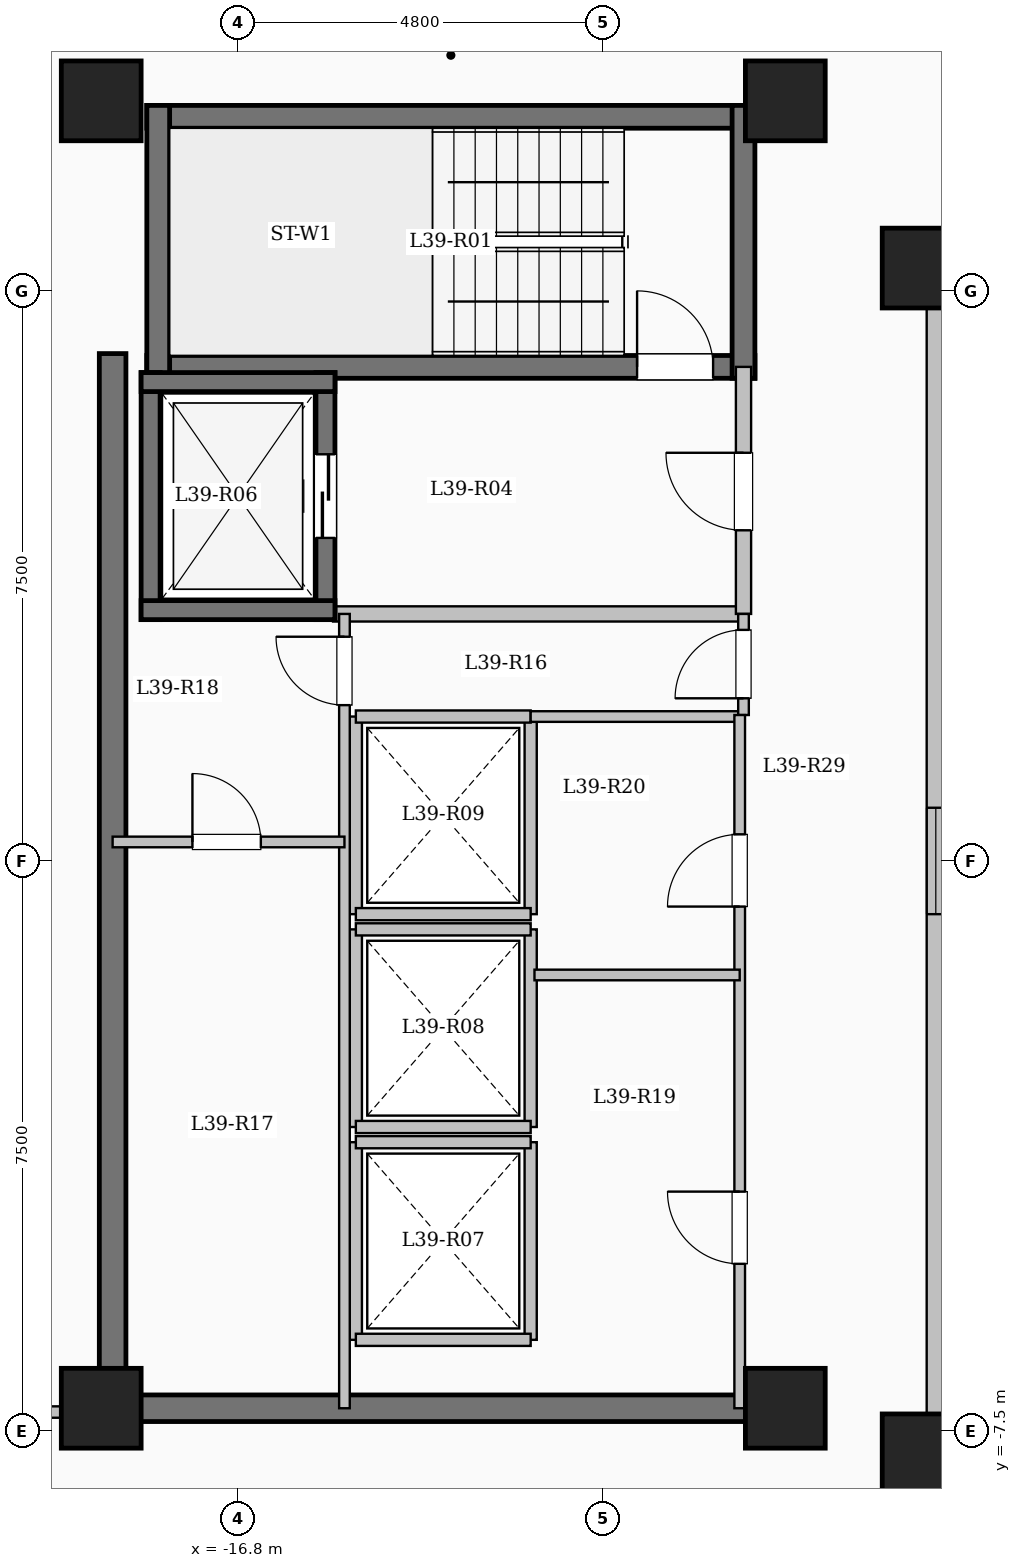
"""IFC4 building model, lengths in metres.
Left out: names, types, materials, properties, quantities, classifications, styles, units other than length and angle.
Written with IfcOpenShell. Run it as: python <this file> out.ifc"""

import sys

from ifc_helpers import new_model, si_unit, direction, frame, frame_2d, origin, origin_2d, place, context, subcontext, project, spatial, rectangle, extrude, element, fill, save


model = new_model("IFC4")
c1 = context("Model", 3, precision=1e-05, world=origin(), true_north=direction((0.0, 1.0)))
c2 = subcontext(c1, "Body", "Model", "MODEL_VIEW")
j1 = project(units=[si_unit("LENGTHUNIT", "METRE"), si_unit("PLANEANGLEUNIT", "RADIAN")], contexts=[c1])
p1 = place(None, origin())
s1 = spatial("IfcSite", under=j1, at=p1, CompositionType="ELEMENT")
p2 = place(p1, origin())
s2 = spatial("IfcBuilding", under=s1, at=p2, CompositionType="ELEMENT")
p3 = place(p2, frame((0.0, 0.0, 146.0)))
s3 = spatial("IfcBuildingStorey", under=s2, at=p3, CompositionType="ELEMENT", Elevation=146.0)
for number, where, z_axis, x_axis in (
    (1, (-7.8, -7.8, 0.0), (0.0, 0.0, 1.0), (1.0, 0.0, 0.0)),
    (2, (-7.8, 7.8, 0.0), (0.0, 0.0, 1.0), (1.0, 0.0, 0.0)),
    (3, (-9.6, -7.2, 0.0), (0.0, 0.0, 1.0), (1.0, 0.0, 0.0)),
    (4, (-9.6, 10.0, 0.0), (0.0, 0.0, 1.0), (1.0, 0.0, 0.0)),
    (5, (-18.6, -7.2, 0.0), (0.0, 0.0, 1.0), (1.0, 0.0, 0.0)),
    (6, (-18.6, 10.0, 0.0), (0.0, 0.0, 1.0), (1.0, 0.0, 0.0)),
):
    element("IfcColumn", number, at=place(p3, frame(where, z_axis=z_axis, x_axis=x_axis)), inside=s3, PredefinedType="COLUMN", context=c2, shape_type="SweptSolid", body=[
        extrude(rectangle(XDim=1.05, YDim=1.05, at=origin_2d()), origin(), (0.0, 0.0, 1.0), 3.35),
    ])
p4 = place(p3, frame((-7.62, -7.62, 0.0), z_axis=(0.0, 0.0, 1.0), x_axis=(1.0, 0.0, 0.0)))
e7 = element("IfcWall", 7, at=p4, inside=s3, PredefinedType="SOLIDWALL", context=c2, shape_type="SweptSolid", body=[
    extrude(rectangle(XDim=15.24, YDim=0.24, at=frame_2d((7.62, 0.0))), origin(), (0.0, 0.0, 1.0), 3.1),
])
p5 = place(p4, frame((6.92, 0.0, 0.95)))
e8 = element("IfcOpeningElement", 8, at=p5, cuts=e7, PredefinedType="OPENING", context=c2, shape_type="SweptSolid", body=[
    extrude(rectangle(XDim=1.4, YDim=1.5, at=frame_2d((0.7, 0.75))), frame((0.0, 0.13, 0.0), z_axis=(0.0, -1.0, 0.0), x_axis=(1.0, 0.0, 0.0)), (0.0, 0.0, 1.0), 0.26),
])
p6 = place(p3, frame((7.62, 7.62, 0.0), z_axis=(0.0, 0.0, 1.0), x_axis=(-1.0, 0.0, 0.0)))
e9 = element("IfcWall", 9, at=p6, inside=s3, PredefinedType="SOLIDWALL", context=c2, shape_type="SweptSolid", body=[
    extrude(rectangle(XDim=15.24, YDim=0.24, at=frame_2d((7.62, 0.0))), origin(), (0.0, 0.0, 1.0), 3.1),
])
p7 = place(p6, frame((6.92, 0.0, 0.95)))
e10 = element("IfcOpeningElement", 10, at=p7, cuts=e9, PredefinedType="OPENING", context=c2, shape_type="SweptSolid", body=[
    extrude(rectangle(XDim=1.4, YDim=1.5, at=frame_2d((0.7, 0.75))), frame((0.0, 0.13, 0.0), z_axis=(0.0, -1.0, 0.0), x_axis=(1.0, 0.0, 0.0)), (0.0, 0.0, 1.0), 0.26),
])
p8 = place(p3, frame((-7.62, 7.62, 0.0), z_axis=(0.0, 0.0, 1.0), x_axis=(0.0, -1.0, 0.0)))
e11 = element("IfcWall", 11, at=p8, inside=s3, PredefinedType="SOLIDWALL", context=c2, shape_type="SweptSolid", body=[
    extrude(rectangle(XDim=15.24, YDim=0.24, at=frame_2d((7.62, 0.0))), origin(), (0.0, 0.0, 1.0), 3.1),
])
p9 = place(p8, frame((6.92, 0.0, 0.95)))
e12 = element("IfcOpeningElement", 12, at=p9, cuts=e11, PredefinedType="OPENING", context=c2, shape_type="SweptSolid", body=[
    extrude(rectangle(XDim=1.4, YDim=1.5, at=frame_2d((0.7, 0.75))), frame((0.0, 0.13, 0.0), z_axis=(0.0, -1.0, 0.0), x_axis=(1.0, 0.0, 0.0)), (0.0, 0.0, 1.0), 0.26),
])
p10 = place(p3, frame((-18.0, 9.79, 0.0), z_axis=(0.0, 0.0, 1.0), x_axis=(1.0, 0.0, 0.0)))
e13 = element("IfcWall", 13, at=p10, inside=s3, PredefinedType="SHEAR", context=c2, shape_type="SweptSolid", body=[
    extrude(rectangle(XDim=8.0, YDim=0.3, at=frame_2d((4.0, 0.0))), origin(), (0.0, 0.0, 1.0), 3.35),
])
p11 = place(p3, frame((-18.0, 6.5, 0.0), z_axis=(0.0, 0.0, 1.0), x_axis=(1.0, 0.0, 0.0)))
e14 = element("IfcWall", 14, at=p11, inside=s3, PredefinedType="SHEAR", context=c2, shape_type="SweptSolid", body=[
    extrude(rectangle(XDim=8.0, YDim=0.3, at=frame_2d((4.0, 0.0))), origin(), (0.0, 0.0, 1.0), 3.35),
])
p12 = place(p11, frame((6.45, 0.0, 0.0)))
e15 = element("IfcOpeningElement", 15, at=p12, cuts=e14, PredefinedType="OPENING", context=c2, shape_type="SweptSolid", body=[
    extrude(rectangle(XDim=1.0, YDim=2.15, at=frame_2d((0.5, 1.075))), frame((0.0, 0.16, 0.0), z_axis=(0.0, -1.0, 0.0), x_axis=(1.0, 0.0, 0.0)), (0.0, 0.0, 1.0), 0.32),
])
for number, where, z_axis, x_axis in (
    (16, (-17.85, 6.35, 0.0), (0.0, 0.0, 1.0), (0.0, 1.0, 0.0)),
    (17, (-10.15, 6.35, 0.0), (0.0, 0.0, 1.0), (0.0, 1.0, 0.0)),
):
    element("IfcWall", number, at=place(p3, frame(where, z_axis=z_axis, x_axis=x_axis)), inside=s3, PredefinedType="SHEAR", context=c2, shape_type="SweptSolid", body=[
        extrude(rectangle(XDim=3.59, YDim=0.3, at=frame_2d((1.795, 0.0))), origin(), (0.0, 0.0, 1.0), 3.35),
    ])
p13 = place(p3, frame((-15.55, 3.25, 0.0), z_axis=(0.0, 0.0, 1.0), x_axis=(1.0, 0.0, 0.0)))
e18 = element("IfcWall", 18, at=p13, inside=s3, PredefinedType="SOLIDWALL", context=c2, shape_type="SweptSolid", body=[
    extrude(rectangle(XDim=5.4, YDim=0.2, at=frame_2d((2.7, 0.0))), origin(), (0.0, 0.0, 1.0), 3.1),
])
p14 = place(p3, frame((-10.15, 3.25, 0.0), z_axis=(0.0, 0.0, 1.0), x_axis=(0.0, 1.0, 0.0)))
e19 = element("IfcWall", 19, at=p14, inside=s3, PredefinedType="SOLIDWALL", context=c2, shape_type="SweptSolid", body=[
    extrude(rectangle(XDim=3.25, YDim=0.2, at=frame_2d((1.625, 0.0))), origin(), (0.0, 0.0, 1.0), 3.1),
])
p15 = place(p14, frame((1.1, 0.0, 0.0)))
e20 = element("IfcOpeningElement", 20, at=p15, cuts=e19, PredefinedType="OPENING", context=c2, shape_type="SweptSolid", body=[
    extrude(rectangle(XDim=1.02, YDim=2.15, at=frame_2d((0.51, 1.075))), frame((0.0, 0.11, 0.0), z_axis=(0.0, -1.0, 0.0), x_axis=(1.0, 0.0, 0.0)), (0.0, 0.0, 1.0), 0.22),
])
p16 = place(p3, frame((-17.95, 3.175, 0.0), z_axis=(0.0, 0.0, 1.0), x_axis=(0.0, 1.0, 0.0)))
e21 = element("IfcWall", 21, at=p16, inside=s3, PredefinedType="SHEAR", context=c2, shape_type="SweptSolid", body=[
    extrude(rectangle(XDim=3.25, YDim=0.25, at=frame_2d((1.625, 0.0))), origin(), (0.0, 0.0, 1.0), 3.35),
])
p17 = place(p3, frame((-15.65, 3.175, 0.0), z_axis=(0.0, 0.0, 1.0), x_axis=(0.0, 1.0, 0.0)))
e22 = element("IfcWall", 22, at=p17, inside=s3, PredefinedType="SHEAR", context=c2, shape_type="SweptSolid", body=[
    extrude(rectangle(XDim=3.25, YDim=0.25, at=frame_2d((1.625, 0.0))), origin(), (0.0, 0.0, 1.0), 3.35),
])
p18 = place(p17, frame((1.075, 0.0, 0.0)))
e23 = element("IfcOpeningElement", 23, at=p18, cuts=e22, PredefinedType="OPENING", context=c2, shape_type="SweptSolid", body=[
    extrude(rectangle(XDim=1.1, YDim=2.15, at=frame_2d((0.55, 1.075))), frame((0.0, 0.135, 0.0), z_axis=(0.0, -1.0, 0.0), x_axis=(1.0, 0.0, 0.0)), (0.0, 0.0, 1.0), 0.27),
])
for number, where, z_axis, x_axis in (
    (24, (-18.075, 3.3, 0.0), (0.0, 0.0, 1.0), (1.0, 0.0, 0.0)),
    (25, (-18.075, 6.3, 0.0), (0.0, 0.0, 1.0), (1.0, 0.0, 0.0)),
):
    element("IfcWall", number, at=place(p3, frame(where, z_axis=z_axis, x_axis=x_axis)), inside=s3, PredefinedType="SHEAR", context=c2, shape_type="SweptSolid", body=[
        extrude(rectangle(XDim=2.55, YDim=0.25, at=frame_2d((1.275, 0.0))), origin(), (0.0, 0.0, 1.0), 3.35),
    ])
for number, where, z_axis, x_axis in (
    (26, (-15.25, -6.3, 0.0), (0.0, 0.0, 1.0), (0.0, 1.0, 0.0)),
    (27, (-12.95, -6.3, 0.0), (0.0, 0.0, 1.0), (0.0, 1.0, 0.0)),
):
    element("IfcWall", number, at=place(p3, frame(where, z_axis=z_axis, x_axis=x_axis)), inside=s3, PredefinedType="SOLIDWALL", context=c2, shape_type="SweptSolid", body=[
        extrude(rectangle(XDim=2.6, YDim=0.16, at=frame_2d((1.3, 0.0))), origin(), (0.0, 0.0, 1.0), 3.1),
    ])
for number, where, z_axis, x_axis in (
    (28, (-15.25, -6.3, 0.0), (0.0, 0.0, 1.0), (1.0, 0.0, 0.0)),
    (29, (-15.25, -3.7, 0.0), (0.0, 0.0, 1.0), (1.0, 0.0, 0.0)),
):
    element("IfcWall", number, at=place(p3, frame(where, z_axis=z_axis, x_axis=x_axis)), inside=s3, PredefinedType="SOLIDWALL", context=c2, shape_type="SweptSolid", body=[
        extrude(rectangle(XDim=2.3, YDim=0.16, at=frame_2d((1.15, 0.0))), origin(), (0.0, 0.0, 1.0), 3.1),
    ])
for number, where, z_axis, x_axis in (
    (30, (-15.25, -3.5, 0.0), (0.0, 0.0, 1.0), (0.0, 1.0, 0.0)),
    (31, (-12.95, -3.5, 0.0), (0.0, 0.0, 1.0), (0.0, 1.0, 0.0)),
):
    element("IfcWall", number, at=place(p3, frame(where, z_axis=z_axis, x_axis=x_axis)), inside=s3, PredefinedType="SOLIDWALL", context=c2, shape_type="SweptSolid", body=[
        extrude(rectangle(XDim=2.6, YDim=0.16, at=frame_2d((1.3, 0.0))), origin(), (0.0, 0.0, 1.0), 3.1),
    ])
for number, where, z_axis, x_axis in (
    (32, (-15.25, -3.5, 0.0), (0.0, 0.0, 1.0), (1.0, 0.0, 0.0)),
    (33, (-15.25, -0.9, 0.0), (0.0, 0.0, 1.0), (1.0, 0.0, 0.0)),
):
    element("IfcWall", number, at=place(p3, frame(where, z_axis=z_axis, x_axis=x_axis)), inside=s3, PredefinedType="SOLIDWALL", context=c2, shape_type="SweptSolid", body=[
        extrude(rectangle(XDim=2.3, YDim=0.16, at=frame_2d((1.15, 0.0))), origin(), (0.0, 0.0, 1.0), 3.1),
    ])
for number, where, z_axis, x_axis in (
    (34, (-15.25, -0.7, 0.0), (0.0, 0.0, 1.0), (0.0, 1.0, 0.0)),
    (35, (-12.95, -0.7, 0.0), (0.0, 0.0, 1.0), (0.0, 1.0, 0.0)),
):
    element("IfcWall", number, at=place(p3, frame(where, z_axis=z_axis, x_axis=x_axis)), inside=s3, PredefinedType="SOLIDWALL", context=c2, shape_type="SweptSolid", body=[
        extrude(rectangle(XDim=2.6, YDim=0.16, at=frame_2d((1.3, 0.0))), origin(), (0.0, 0.0, 1.0), 3.1),
    ])
for number, where, z_axis, x_axis in (
    (36, (-15.25, -0.7, 0.0), (0.0, 0.0, 1.0), (1.0, 0.0, 0.0)),
    (37, (-15.25, 1.9, 0.0), (0.0, 0.0, 1.0), (1.0, 0.0, 0.0)),
):
    element("IfcWall", number, at=place(p3, frame(where, z_axis=z_axis, x_axis=x_axis)), inside=s3, PredefinedType="SOLIDWALL", context=c2, shape_type="SweptSolid", body=[
        extrude(rectangle(XDim=2.3, YDim=0.16, at=frame_2d((1.15, 0.0))), origin(), (0.0, 0.0, 1.0), 3.1),
    ])
p19 = place(p3, frame((-18.45, -7.375, 0.0), z_axis=(0.0, 0.0, 1.0), x_axis=(0.0, 1.0, 0.0)))
e38 = element("IfcWall", 38, at=p19, inside=s3, PredefinedType="SHEAR", context=c2, shape_type="SweptSolid", body=[
    extrude(rectangle(XDim=14.05, YDim=0.35, at=frame_2d((7.025, 0.0))), origin(), (0.0, 0.0, 1.0), 3.35),
])
p20 = place(p3, frame((-18.625, -7.2, 0.0), z_axis=(0.0, 0.0, 1.0), x_axis=(1.0, 0.0, 0.0)))
e39 = element("IfcWall", 39, at=p20, inside=s3, PredefinedType="SHEAR", context=c2, shape_type="SweptSolid", body=[
    extrude(rectangle(XDim=8.55, YDim=0.35, at=frame_2d((4.275, 0.0))), origin(), (0.0, 0.0, 1.0), 3.35),
])
p21 = place(p3, frame((-12.95, 1.9, 0.0), z_axis=(0.0, 0.0, 1.0), x_axis=(1.0, 0.0, 0.0)))
e40 = element("IfcWall", 40, at=p21, inside=s3, PredefinedType="PARTITIONING", context=c2, shape_type="SweptSolid", body=[
    extrude(rectangle(XDim=2.8, YDim=0.14, at=frame_2d((1.4, 0.0))), origin(), (0.0, 0.0, 1.0), 3.1),
])
p22 = place(p3, frame((-10.15, 1.92, 0.0), z_axis=(0.0, 0.0, 1.0), x_axis=(0.0, 1.0, 0.0)))
e41 = element("IfcWall", 41, at=p22, inside=s3, PredefinedType="PARTITIONING", context=c2, shape_type="SweptSolid", body=[
    extrude(rectangle(XDim=1.33, YDim=0.14, at=frame_2d((0.665, 0.0))), origin(), (0.0, 0.0, 1.0), 3.1),
])
p23 = place(p22, frame((0.22, 0.0, 0.0)))
e42 = element("IfcOpeningElement", 42, at=p23, cuts=e41, PredefinedType="OPENING", context=c2, shape_type="SweptSolid", body=[
    extrude(rectangle(XDim=0.9, YDim=2.08, at=frame_2d((0.45, 1.04))), frame((0.0, 0.08, 0.0), z_axis=(0.0, -1.0, 0.0), x_axis=(1.0, 0.0, 0.0)), (0.0, 0.0, 1.0), 0.16),
])
p24 = place(p3, frame((-15.4, -7.2, 0.0), z_axis=(0.0, 0.0, 1.0), x_axis=(0.0, 1.0, 0.0)))
e43 = element("IfcWall", 43, at=p24, inside=s3, PredefinedType="PARTITIONING", context=c2, shape_type="SweptSolid", body=[
    extrude(rectangle(XDim=10.45, YDim=0.14, at=frame_2d((5.225, 0.0))), origin(), (0.0, 0.0, 1.0), 3.1),
])
p25 = place(p24, frame((9.25, 0.0, 0.0)))
e44 = element("IfcOpeningElement", 44, at=p25, cuts=e43, PredefinedType="OPENING", context=c2, shape_type="SweptSolid", body=[
    extrude(rectangle(XDim=0.9, YDim=2.08, at=frame_2d((0.45, 1.04))), frame((0.0, 0.08, 0.0), z_axis=(0.0, -1.0, 0.0), x_axis=(1.0, 0.0, 0.0)), (0.0, 0.0, 1.0), 0.16),
])
p26 = place(p3, frame((-18.45, 0.25, 0.0), z_axis=(0.0, 0.0, 1.0), x_axis=(1.0, 0.0, 0.0)))
e45 = element("IfcWall", 45, at=p26, inside=s3, PredefinedType="PARTITIONING", context=c2, shape_type="SweptSolid", body=[
    extrude(rectangle(XDim=3.05, YDim=0.14, at=frame_2d((1.525, 0.0))), origin(), (0.0, 0.0, 1.0), 3.1),
])
p27 = place(p26, frame((1.05, 0.0, 0.0)))
e46 = element("IfcOpeningElement", 46, at=p27, cuts=e45, PredefinedType="OPENING", context=c2, shape_type="SweptSolid", body=[
    extrude(rectangle(XDim=0.9, YDim=2.08, at=frame_2d((0.45, 1.04))), frame((0.0, 0.08, 0.0), z_axis=(0.0, -1.0, 0.0), x_axis=(1.0, 0.0, 0.0)), (0.0, 0.0, 1.0), 0.16),
])
p28 = place(p3, frame((-10.2, -7.2, 0.0), z_axis=(0.0, 0.0, 1.0), x_axis=(0.0, 1.0, 0.0)))
e47 = element("IfcWall", 47, at=p28, inside=s3, PredefinedType="PARTITIONING", context=c2, shape_type="SweptSolid", body=[
    extrude(rectangle(XDim=9.12, YDim=0.14, at=frame_2d((4.56, 0.0))), origin(), (0.0, 0.0, 1.0), 3.1),
])
p29 = place(p28, frame((1.9, 0.0, 0.0)))
e48 = element("IfcOpeningElement", 48, at=p29, cuts=e47, PredefinedType="OPENING", context=c2, shape_type="SweptSolid", body=[
    extrude(rectangle(XDim=0.95, YDim=2.12, at=frame_2d((0.475, 1.06))), frame((0.0, 0.08, 0.0), z_axis=(0.0, -1.0, 0.0), x_axis=(1.0, 0.0, 0.0)), (0.0, 0.0, 1.0), 0.16),
])
p30 = place(p28, frame((6.6, 0.0, 0.0)))
e49 = element("IfcOpeningElement", 49, at=p30, cuts=e47, PredefinedType="OPENING", context=c2, shape_type="SweptSolid", body=[
    extrude(rectangle(XDim=0.95, YDim=2.12, at=frame_2d((0.475, 1.06))), frame((0.0, 0.08, 0.0), z_axis=(0.0, -1.0, 0.0), x_axis=(1.0, 0.0, 0.0)), (0.0, 0.0, 1.0), 0.16),
])
p31 = place(p3, frame((-12.9, -1.5, 0.0), z_axis=(0.0, 0.0, 1.0), x_axis=(1.0, 0.0, 0.0)))
e50 = element("IfcWall", 50, at=p31, inside=s3, PredefinedType="PARTITIONING", context=c2, shape_type="SweptSolid", body=[
    extrude(rectangle(XDim=2.7, YDim=0.14, at=frame_2d((1.35, 0.0))), origin(), (0.0, 0.0, 1.0), 3.1),
])
p32 = place(p3, frame((-25.08, -7.25, 0.0), z_axis=(0.0, 0.0, 1.0), x_axis=(1.0, 0.0, 0.0)))
e51 = element("IfcWall", 51, at=p32, inside=s3, PredefinedType="PARTITIONING", context=c2, shape_type="SweptSolid", body=[
    extrude(rectangle(XDim=6.63, YDim=0.15, at=frame_2d((3.315, 0.0))), origin(), (0.0, 0.0, 1.0), 3.1),
])
p33 = place(p32, frame((3.58, 0.0, 0.0)))
e52 = element("IfcOpeningElement", 52, at=p33, cuts=e51, PredefinedType="OPENING", context=c2, shape_type="SweptSolid", body=[
    extrude(rectangle(XDim=1.08, YDim=2.15, at=frame_2d((0.54, 1.075))), frame((0.0, 0.085, 0.0), z_axis=(0.0, -1.0, 0.0), x_axis=(1.0, 0.0, 0.0)), (0.0, 0.0, 1.0), 0.17),
])
p34 = place(p9, origin())
e53 = element("IfcWindow", 53, at=p34, inside=s3, PartitioningType="SINGLE_PANEL", PredefinedType="WINDOW", context=c2, shape_type="SweptSolid", body=[
    extrude(rectangle(XDim=1.4, YDim=1.5, at=frame_2d((0.7, 0.75))), frame((0.0, 0.03, 0.0), z_axis=(0.0, -1.0, 0.0), x_axis=(1.0, 0.0, 0.0)), (0.0, 0.0, 1.0), 0.06),
])
fill(e12, e53)
p35 = place(p12, origin())
e54 = element("IfcDoor", 54, at=p35, inside=s3, OperationType="SINGLE_SWING_LEFT", PredefinedType="DOOR", context=c2, shape_type="SweptSolid", body=[
    extrude(rectangle(XDim=1.0, YDim=2.15, at=frame_2d((0.5, 1.075))), frame((0.0, 0.025, 0.0), z_axis=(0.0, -1.0, 0.0), x_axis=(1.0, 0.0, 0.0)), (0.0, 0.0, 1.0), 0.05),
])
fill(e15, e54)
p36 = place(p15, origin())
e55 = element("IfcDoor", 55, at=p36, inside=s3, OperationType="SINGLE_SWING_RIGHT", PredefinedType="DOOR", context=c2, shape_type="SweptSolid", body=[
    extrude(rectangle(XDim=1.02, YDim=2.15, at=frame_2d((0.51, 1.075))), frame((0.0, 0.025, 0.0), z_axis=(0.0, -1.0, 0.0), x_axis=(1.0, 0.0, 0.0)), (0.0, 0.0, 1.0), 0.05),
])
fill(e20, e55)
p37 = place(p18, origin())
e56 = element("IfcDoor", 56, at=p37, inside=s3, OperationType="SLIDING_TO_LEFT", PredefinedType="DOOR", context=c2, shape_type="SweptSolid", body=[
    extrude(rectangle(XDim=1.1, YDim=2.15, at=frame_2d((0.55, 1.075))), frame((0.0, 0.025, 0.0), z_axis=(0.0, -1.0, 0.0), x_axis=(1.0, 0.0, 0.0)), (0.0, 0.0, 1.0), 0.05),
])
fill(e23, e56)
p38 = place(p23, origin())
e57 = element("IfcDoor", 57, at=p38, inside=s3, OperationType="SINGLE_SWING_LEFT", PredefinedType="DOOR", context=c2, shape_type="SweptSolid", body=[
    extrude(rectangle(XDim=0.9, YDim=2.08, at=frame_2d((0.45, 1.04))), frame((0.0, 0.025, 0.0), z_axis=(0.0, -1.0, 0.0), x_axis=(1.0, 0.0, 0.0)), (0.0, 0.0, 1.0), 0.05),
])
fill(e42, e57)
p39 = place(p25, origin())
e58 = element("IfcDoor", 58, at=p39, inside=s3, OperationType="SINGLE_SWING_RIGHT", PredefinedType="DOOR", context=c2, shape_type="SweptSolid", body=[
    extrude(rectangle(XDim=0.9, YDim=2.08, at=frame_2d((0.45, 1.04))), frame((0.0, 0.025, 0.0), z_axis=(0.0, -1.0, 0.0), x_axis=(1.0, 0.0, 0.0)), (0.0, 0.0, 1.0), 0.05),
])
fill(e44, e58)
p40 = place(p27, origin())
e59 = element("IfcDoor", 59, at=p40, inside=s3, OperationType="SINGLE_SWING_LEFT", PredefinedType="DOOR", context=c2, shape_type="SweptSolid", body=[
    extrude(rectangle(XDim=0.9, YDim=2.08, at=frame_2d((0.45, 1.04))), frame((0.0, 0.025, 0.0), z_axis=(0.0, -1.0, 0.0), x_axis=(1.0, 0.0, 0.0)), (0.0, 0.0, 1.0), 0.05),
])
fill(e46, e59)
p41 = place(p29, origin())
e60 = element("IfcDoor", 60, at=p41, inside=s3, OperationType="SINGLE_SWING_RIGHT", PredefinedType="DOOR", context=c2, shape_type="SweptSolid", body=[
    extrude(rectangle(XDim=0.95, YDim=2.12, at=frame_2d((0.475, 1.06))), frame((0.0, 0.025, 0.0), z_axis=(0.0, -1.0, 0.0), x_axis=(1.0, 0.0, 0.0)), (0.0, 0.0, 1.0), 0.05),
])
fill(e48, e60)
p42 = place(p30, origin())
e61 = element("IfcDoor", 61, at=p42, inside=s3, OperationType="SINGLE_SWING_LEFT", PredefinedType="DOOR", context=c2, shape_type="SweptSolid", body=[
    extrude(rectangle(XDim=0.95, YDim=2.12, at=frame_2d((0.475, 1.06))), frame((0.0, 0.025, 0.0), z_axis=(0.0, -1.0, 0.0), x_axis=(1.0, 0.0, 0.0)), (0.0, 0.0, 1.0), 0.05),
])
fill(e49, e61)
save(model, sys.argv[1])
